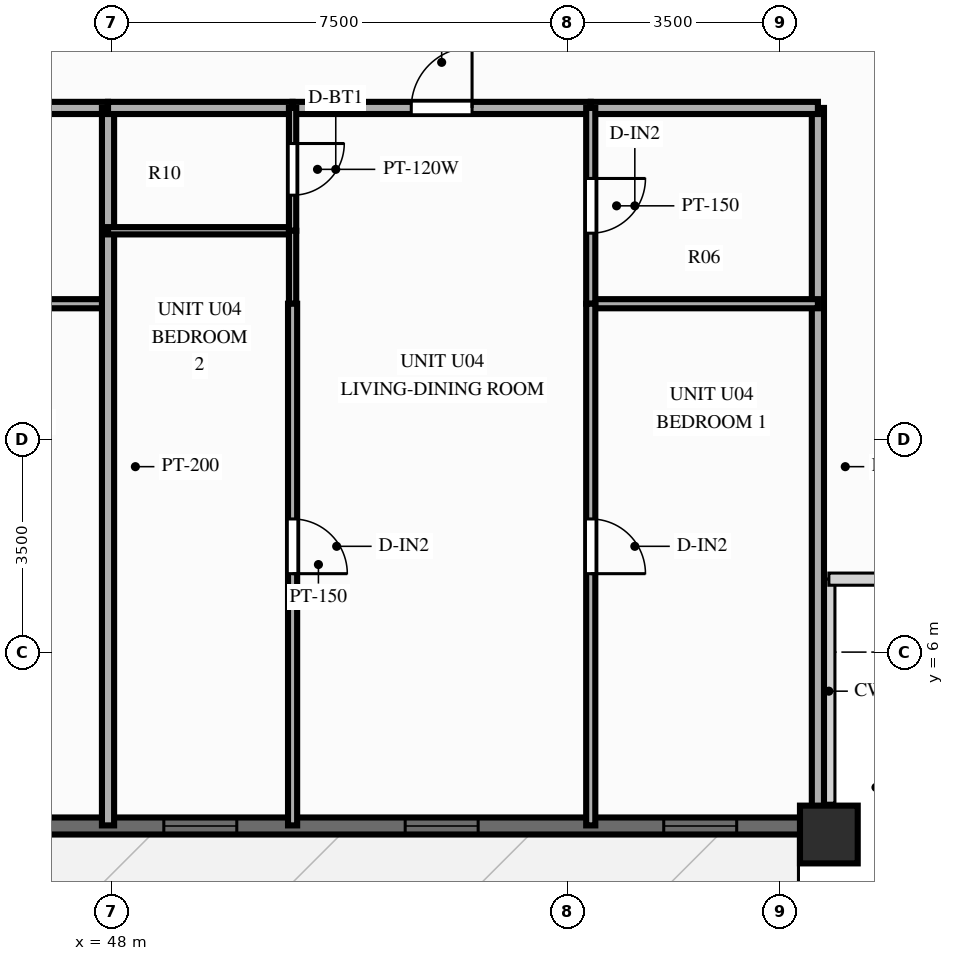
"""IFC4 building model, lengths in metres.
Left out: names, types, materials, properties, quantities, classifications, styles, units other than length and angle.
Written with IfcOpenShell. Run it as: python <this file> out.ifc"""

import sys

from ifc_helpers import new_model, si_unit, direction, frame, frame_2d, origin, origin_2d, place, context, subcontext, project, spatial, rectangle, extrude, source, transform, mapped, element, fill, save


model = new_model("IFC4")
c1 = context("Model", 3, precision=1e-05, world=origin(), true_north=direction((0.0, 1.0)))
c2 = subcontext(c1, "Body", "Model", "MODEL_VIEW")
j1 = project(units=[si_unit("LENGTHUNIT", "METRE"), si_unit("PLANEANGLEUNIT", "RADIAN")], contexts=[c1])
p1 = place(None, origin())
s1 = spatial("IfcSite", under=j1, at=p1, CompositionType="ELEMENT")
p2 = place(p1, origin())
s2 = spatial("IfcBuilding", under=s1, at=p2, CompositionType="ELEMENT")
p3 = place(p2, frame((0.0, 0.0, 89.85)))
s3 = spatial("IfcBuildingStorey", under=s2, at=p3, CompositionType="ELEMENT", Elevation=89.85)
m1 = source(origin(), c2, "Body", "SweptSolid", [
    extrude(rectangle(XDim=0.95, YDim=0.95, at=origin_2d()), origin(), (0.0, 0.0, 1.0), 3.0),
])
p4 = place(p3, frame((59.8, 3.0, 0.0), z_axis=(0.0, 0.0, 1.0), x_axis=(1.0, 0.0, 0.0)))
e1 = element("IfcColumn", 1, at=p4, inside=s3, PredefinedType="COLUMN", context=c2, shape_type="MappedRepresentation", body=[
    mapped(m1, transform((0.0, 0.0, 0.0), scale=1.0)),
])
p5 = place(p3, frame((16.2, 3.14, 0.0), z_axis=(0.0, 0.0, 1.0), x_axis=(1.0, 0.0, 0.0)))
e2 = element("IfcWall", 2, at=p5, inside=s3, PredefinedType="SOLIDWALL", context=c2, shape_type="SweptSolid", body=[
    extrude(rectangle(XDim=43.6, YDim=0.28, at=frame_2d((21.8, 0.0))), origin(), (0.0, 0.0, 1.0), 2.28),
])
p6 = place(p5, frame((1.022, 0.0, 0.25)))
e3 = element("IfcOpeningElement", 3, at=p6, cuts=e2, PredefinedType="OPENING", context=c2, shape_type="SweptSolid", body=[
    extrude(rectangle(XDim=1.2, YDim=1.5, at=frame_2d((0.6, 0.75))), frame((0.0, 0.152, 0.0), z_axis=(0.0, -1.0, 0.0), x_axis=(1.0, 0.0, 0.0)), (0.0, 0.0, 1.0), 0.304),
])
p7 = place(p5, frame((4.038, 0.0, 0.25)))
e4 = element("IfcOpeningElement", 4, at=p7, cuts=e2, PredefinedType="OPENING", context=c2, shape_type="SweptSolid", body=[
    extrude(rectangle(XDim=1.2, YDim=1.5, at=frame_2d((0.6, 0.75))), frame((0.0, 0.152, 0.0), z_axis=(0.0, -1.0, 0.0), x_axis=(1.0, 0.0, 0.0)), (0.0, 0.0, 1.0), 0.304),
])
p8 = place(p5, frame((7.635, 0.0, 0.25)))
e5 = element("IfcOpeningElement", 5, at=p8, cuts=e2, PredefinedType="OPENING", context=c2, shape_type="SweptSolid", body=[
    extrude(rectangle(XDim=1.2, YDim=1.5, at=frame_2d((0.6, 0.75))), frame((0.0, 0.152, 0.0), z_axis=(0.0, -1.0, 0.0), x_axis=(1.0, 0.0, 0.0)), (0.0, 0.0, 1.0), 0.304),
])
p9 = place(p5, frame((10.9, 0.0, 0.25)))
e6 = element("IfcOpeningElement", 6, at=p9, cuts=e2, PredefinedType="OPENING", context=c2, shape_type="SweptSolid", body=[
    extrude(rectangle(XDim=1.2, YDim=1.5, at=frame_2d((0.6, 0.75))), frame((0.0, 0.152, 0.0), z_axis=(0.0, -1.0, 0.0), x_axis=(1.0, 0.0, 0.0)), (0.0, 0.0, 1.0), 0.304),
])
p10 = place(p5, frame((13.33, 0.0, 0.25)))
e7 = element("IfcOpeningElement", 7, at=p10, cuts=e2, PredefinedType="OPENING", context=c2, shape_type="SweptSolid", body=[
    extrude(rectangle(XDim=1.2, YDim=1.5, at=frame_2d((0.6, 0.75))), frame((0.0, 0.152, 0.0), z_axis=(0.0, -1.0, 0.0), x_axis=(1.0, 0.0, 0.0)), (0.0, 0.0, 1.0), 0.304),
])
p11 = place(p5, frame((17.581, 0.0, 0.25)))
e8 = element("IfcOpeningElement", 8, at=p11, cuts=e2, PredefinedType="OPENING", context=c2, shape_type="SweptSolid", body=[
    extrude(rectangle(XDim=1.2, YDim=1.5, at=frame_2d((0.6, 0.75))), frame((0.0, 0.152, 0.0), z_axis=(0.0, -1.0, 0.0), x_axis=(1.0, 0.0, 0.0)), (0.0, 0.0, 1.0), 0.304),
])
p12 = place(p5, frame((20.988, 0.0, 0.25)))
e9 = element("IfcOpeningElement", 9, at=p12, cuts=e2, PredefinedType="OPENING", context=c2, shape_type="SweptSolid", body=[
    extrude(rectangle(XDim=1.2, YDim=1.5, at=frame_2d((0.6, 0.75))), frame((0.0, 0.152, 0.0), z_axis=(0.0, -1.0, 0.0), x_axis=(1.0, 0.0, 0.0)), (0.0, 0.0, 1.0), 0.304),
])
p13 = place(p5, frame((26.095, 0.0, 0.0), z_axis=(0.0, 0.0, 1.0), x_axis=(-1.0, 0.0, 0.0)))
e10 = element("IfcOpeningElement", 10, at=p13, cuts=e2, PredefinedType="OPENING", context=c2, shape_type="SweptSolid", body=[
    extrude(rectangle(XDim=1.1, YDim=2.15, at=frame_2d((0.55, 1.075))), frame((0.0, 0.152, 0.0), z_axis=(0.0, -1.0, 0.0), x_axis=(1.0, 0.0, 0.0)), (0.0, 0.0, 1.0), 0.304),
])
p14 = place(p5, frame((29.58, 0.0, 0.25)))
e11 = element("IfcOpeningElement", 11, at=p14, cuts=e2, PredefinedType="OPENING", context=c2, shape_type="SweptSolid", body=[
    extrude(rectangle(XDim=1.2, YDim=1.5, at=frame_2d((0.6, 0.75))), frame((0.0, 0.152, 0.0), z_axis=(0.0, -1.0, 0.0), x_axis=(1.0, 0.0, 0.0)), (0.0, 0.0, 1.0), 0.304),
])
p15 = place(p5, frame((32.663, 0.0, 0.25)))
e12 = element("IfcOpeningElement", 12, at=p15, cuts=e2, PredefinedType="OPENING", context=c2, shape_type="SweptSolid", body=[
    extrude(rectangle(XDim=1.2, YDim=1.5, at=frame_2d((0.6, 0.75))), frame((0.0, 0.152, 0.0), z_axis=(0.0, -1.0, 0.0), x_axis=(1.0, 0.0, 0.0)), (0.0, 0.0, 1.0), 0.304),
])
p16 = place(p5, frame((36.632, 0.0, 0.25)))
e13 = element("IfcOpeningElement", 13, at=p16, cuts=e2, PredefinedType="OPENING", context=c2, shape_type="SweptSolid", body=[
    extrude(rectangle(XDim=1.2, YDim=1.5, at=frame_2d((0.6, 0.75))), frame((0.0, 0.152, 0.0), z_axis=(0.0, -1.0, 0.0), x_axis=(1.0, 0.0, 0.0)), (0.0, 0.0, 1.0), 0.304),
])
p17 = place(p5, frame((40.885, 0.0, 0.25)))
e14 = element("IfcOpeningElement", 14, at=p17, cuts=e2, PredefinedType="OPENING", context=c2, shape_type="SweptSolid", body=[
    extrude(rectangle(XDim=1.2, YDim=1.5, at=frame_2d((0.6, 0.75))), frame((0.0, 0.152, 0.0), z_axis=(0.0, -1.0, 0.0), x_axis=(1.0, 0.0, 0.0)), (0.0, 0.0, 1.0), 0.304),
])
p18 = place(p3, frame((59.62, 14.95, 0.0), z_axis=(0.0, 0.0, 1.0), x_axis=(0.0, -1.0, 0.0)))
e15 = element("IfcWall", 15, at=p18, inside=s3, PredefinedType="PARTITIONING", context=c2, shape_type="SweptSolid", body=[
    extrude(rectangle(XDim=11.8, YDim=0.2, at=frame_2d((5.9, 0.0))), origin(), (0.0, 0.0, 1.0), 2.79),
])
p19 = place(p3, frame((44.22, 14.95, 0.0), z_axis=(0.0, 0.0, 1.0), x_axis=(1.0, 0.0, 0.0)))
e16 = element("IfcWall", 16, at=p19, inside=s3, PredefinedType="PARTITIONING", context=c2, shape_type="SweptSolid", body=[
    extrude(rectangle(XDim=3.725, YDim=0.2, at=frame_2d((1.863, 0.0))), origin(), (0.0, 0.0, 1.0), 2.79),
])
p20 = place(p3, frame((44.22, 11.73, 0.0), z_axis=(0.0, 0.0, 1.0), x_axis=(1.0, 0.0, 0.0)))
e17 = element("IfcWall", 17, at=p20, inside=s3, PredefinedType="PARTITIONING", context=c2, shape_type="SweptSolid", body=[
    extrude(rectangle(XDim=3.725, YDim=0.15, at=frame_2d((1.863, 0.0))), origin(), (0.0, 0.0, 1.0), 2.79),
])
p21 = place(p3, frame((47.945, 14.95, 0.0), z_axis=(0.0, 0.0, 1.0), x_axis=(0.0, -1.0, 0.0)))
e18 = element("IfcWall", 18, at=p21, inside=s3, PredefinedType="PARTITIONING", context=c2, shape_type="SweptSolid", body=[
    extrude(rectangle(XDim=11.8, YDim=0.2, at=frame_2d((5.9, 0.0))), origin(), (0.0, 0.0, 1.0), 2.79),
])
p22 = place(p3, frame((47.945, 14.95, 0.0), z_axis=(0.0, 0.0, 1.0), x_axis=(1.0, 0.0, 0.0)))
e19 = element("IfcWall", 19, at=p22, inside=s3, PredefinedType="PARTITIONING", context=c2, shape_type="SweptSolid", body=[
    extrude(rectangle(XDim=3.035, YDim=0.2, at=frame_2d((1.518, 0.0))), origin(), (0.0, 0.0, 1.0), 2.79),
])
p23 = place(p3, frame((50.981, 14.95, 0.0), z_axis=(0.0, 0.0, 1.0), x_axis=(1.0, 0.0, 0.0)))
e20 = element("IfcWall", 20, at=p23, inside=s3, PredefinedType="PARTITIONING", context=c2, shape_type="SweptSolid", body=[
    extrude(rectangle(XDim=4.903, YDim=0.2, at=frame_2d((2.452, 0.0))), origin(), (0.0, 0.0, 1.0), 2.79),
])
p24 = place(p23, frame((1.952, 0.0, 0.0)))
e21 = element("IfcOpeningElement", 21, at=p24, cuts=e20, PredefinedType="OPENING", context=c2, shape_type="SweptSolid", body=[
    extrude(rectangle(XDim=1.0, YDim=2.15, at=frame_2d((0.5, 1.075))), frame((0.0, 0.112, 0.0), z_axis=(0.0, -1.0, 0.0), x_axis=(1.0, 0.0, 0.0)), (0.0, 0.0, 1.0), 0.224),
])
p25 = place(p3, frame((55.884, 14.95, 0.0), z_axis=(0.0, 0.0, 1.0), x_axis=(1.0, 0.0, 0.0)))
e22 = element("IfcWall", 22, at=p25, inside=s3, PredefinedType="PARTITIONING", context=c2, shape_type="SweptSolid", body=[
    extrude(rectangle(XDim=3.736, YDim=0.2, at=frame_2d((1.868, 0.0))), origin(), (0.0, 0.0, 1.0), 2.79),
])
p26 = place(p3, frame((47.945, 12.93, 0.0), z_axis=(0.0, 0.0, 1.0), x_axis=(1.0, 0.0, 0.0)))
e23 = element("IfcWall", 23, at=p26, inside=s3, PredefinedType="PARTITIONING", context=c2, shape_type="SweptSolid", body=[
    extrude(rectangle(XDim=3.035, YDim=0.12, at=frame_2d((1.518, 0.0))), origin(), (0.0, 0.0, 1.0), 2.79),
])
p27 = place(p3, frame((55.884, 11.73, 0.0), z_axis=(0.0, 0.0, 1.0), x_axis=(1.0, 0.0, 0.0)))
e24 = element("IfcWall", 24, at=p27, inside=s3, PredefinedType="PARTITIONING", context=c2, shape_type="SweptSolid", body=[
    extrude(rectangle(XDim=3.736, YDim=0.15, at=frame_2d((1.868, 0.0))), origin(), (0.0, 0.0, 1.0), 2.79),
])
p28 = place(p3, frame((50.981, 14.95, 0.0), z_axis=(0.0, 0.0, 1.0), x_axis=(0.0, -1.0, 0.0)))
e25 = element("IfcWall", 25, at=p28, inside=s3, PredefinedType="PARTITIONING", context=c2, shape_type="SweptSolid", body=[
    extrude(rectangle(XDim=2.02, YDim=0.12, at=frame_2d((1.01, 0.0))), origin(), (0.0, 0.0, 1.0), 2.79),
])
p29 = place(p28, frame((0.585, 0.0, 0.0)))
e26 = element("IfcOpeningElement", 26, at=p29, cuts=e25, PredefinedType="OPENING", context=c2, shape_type="SweptSolid", body=[
    extrude(rectangle(XDim=0.85, YDim=2.05, at=frame_2d((0.425, 1.025))), frame((0.0, 0.072, 0.0), z_axis=(0.0, -1.0, 0.0), x_axis=(1.0, 0.0, 0.0)), (0.0, 0.0, 1.0), 0.144),
])
p30 = place(p3, frame((50.981, 12.93, 0.0), z_axis=(0.0, 0.0, 1.0), x_axis=(0.0, -1.0, 0.0)))
e27 = element("IfcWall", 27, at=p30, inside=s3, PredefinedType="PARTITIONING", context=c2, shape_type="SweptSolid", body=[
    extrude(rectangle(XDim=1.2, YDim=0.12, at=frame_2d((0.6, 0.0))), origin(), (0.0, 0.0, 1.0), 2.79),
])
p31 = place(p3, frame((50.981, 11.73, 0.0), z_axis=(0.0, 0.0, 1.0), x_axis=(0.0, -1.0, 0.0)))
e28 = element("IfcWall", 28, at=p31, inside=s3, PredefinedType="PARTITIONING", context=c2, shape_type="SweptSolid", body=[
    extrude(rectangle(XDim=8.58, YDim=0.15, at=frame_2d((4.29, 0.0))), origin(), (0.0, 0.0, 1.0), 2.79),
])
p32 = place(p31, frame((3.54, 0.0, 0.0)))
e29 = element("IfcOpeningElement", 29, at=p32, cuts=e28, PredefinedType="OPENING", context=c2, shape_type="SweptSolid", body=[
    extrude(rectangle(XDim=0.9, YDim=2.1, at=frame_2d((0.45, 1.05))), frame((0.0, 0.087, 0.0), z_axis=(0.0, -1.0, 0.0), x_axis=(1.0, 0.0, 0.0)), (0.0, 0.0, 1.0), 0.174),
])
p33 = place(p3, frame((55.884, 14.95, 0.0), z_axis=(0.0, 0.0, 1.0), x_axis=(0.0, -1.0, 0.0)))
e30 = element("IfcWall", 30, at=p33, inside=s3, PredefinedType="PARTITIONING", context=c2, shape_type="SweptSolid", body=[
    extrude(rectangle(XDim=3.22, YDim=0.15, at=frame_2d((1.61, 0.0))), origin(), (0.0, 0.0, 1.0), 2.79),
])
p34 = place(p33, frame((1.16, 0.0, 0.0)))
e31 = element("IfcOpeningElement", 31, at=p34, cuts=e30, PredefinedType="OPENING", context=c2, shape_type="SweptSolid", body=[
    extrude(rectangle(XDim=0.9, YDim=2.1, at=frame_2d((0.45, 1.05))), frame((0.0, 0.087, 0.0), z_axis=(0.0, -1.0, 0.0), x_axis=(1.0, 0.0, 0.0)), (0.0, 0.0, 1.0), 0.174),
])
p35 = place(p3, frame((55.884, 11.73, 0.0), z_axis=(0.0, 0.0, 1.0), x_axis=(0.0, -1.0, 0.0)))
e32 = element("IfcWall", 32, at=p35, inside=s3, PredefinedType="PARTITIONING", context=c2, shape_type="SweptSolid", body=[
    extrude(rectangle(XDim=8.58, YDim=0.15, at=frame_2d((4.29, 0.0))), origin(), (0.0, 0.0, 1.0), 2.79),
])
p36 = place(p35, frame((3.54, 0.0, 0.0)))
e33 = element("IfcOpeningElement", 33, at=p36, cuts=e32, PredefinedType="OPENING", context=c2, shape_type="SweptSolid", body=[
    extrude(rectangle(XDim=0.9, YDim=2.1, at=frame_2d((0.45, 1.05))), frame((0.0, 0.087, 0.0), z_axis=(0.0, -1.0, 0.0), x_axis=(1.0, 0.0, 0.0)), (0.0, 0.0, 1.0), 0.174),
])
m2 = source(origin(), c2, "Body", "SweptSolid", [
    extrude(rectangle(XDim=1.2, YDim=1.5, at=frame_2d((0.6, 0.75))), frame((0.0, 0.03, 0.0), z_axis=(0.0, -1.0, 0.0), x_axis=(1.0, 0.0, 0.0)), (0.0, 0.0, 1.0), 0.06),
])
p37 = place(p15, origin())
e34 = element("IfcWindow", 34, at=p37, inside=s3, PartitioningType="SINGLE_PANEL", PredefinedType="WINDOW", context=c2, shape_type="MappedRepresentation", body=[
    mapped(m2, transform((0.0, 0.0, 0.0), scale=1.0)),
])
fill(e12, e34)
p38 = place(p16, origin())
e35 = element("IfcWindow", 35, at=p38, inside=s3, PartitioningType="SINGLE_PANEL", PredefinedType="WINDOW", context=c2, shape_type="MappedRepresentation", body=[
    mapped(m2, transform((0.0, 0.0, 0.0), scale=1.0)),
])
fill(e13, e35)
p39 = place(p17, origin())
e36 = element("IfcWindow", 36, at=p39, inside=s3, PartitioningType="SINGLE_PANEL", PredefinedType="WINDOW", context=c2, shape_type="MappedRepresentation", body=[
    mapped(m2, transform((0.0, 0.0, 0.0), scale=1.0)),
])
fill(e14, e36)
m3 = source(origin(), c2, "Body", "SweptSolid", [
    extrude(rectangle(XDim=1.0, YDim=2.15, at=frame_2d((0.5, 1.075))), frame((0.0, 0.025, 0.0), z_axis=(0.0, -1.0, 0.0), x_axis=(1.0, 0.0, 0.0)), (0.0, 0.0, 1.0), 0.05),
])
p40 = place(p24, origin())
e37 = element("IfcDoor", 37, at=p40, inside=s3, OperationType="SINGLE_SWING_RIGHT", PredefinedType="DOOR", context=c2, shape_type="MappedRepresentation", body=[
    mapped(m3, transform((0.0, 0.0, 0.0), scale=1.0)),
])
fill(e21, e37)
m4 = source(origin(), c2, "Body", "SweptSolid", [
    extrude(rectangle(XDim=0.85, YDim=2.05, at=frame_2d((0.425, 1.025))), frame((0.0, 0.025, 0.0), z_axis=(0.0, -1.0, 0.0), x_axis=(1.0, 0.0, 0.0)), (0.0, 0.0, 1.0), 0.05),
])
p41 = place(p29, origin())
e38 = element("IfcDoor", 38, at=p41, inside=s3, OperationType="SINGLE_SWING_LEFT", PredefinedType="DOOR", context=c2, shape_type="MappedRepresentation", body=[
    mapped(m4, transform((0.0, 0.0, 0.0), scale=1.0)),
])
fill(e26, e38)
m5 = source(origin(), c2, "Body", "SweptSolid", [
    extrude(rectangle(XDim=0.9, YDim=2.1, at=frame_2d((0.45, 1.05))), frame((0.0, 0.025, 0.0), z_axis=(0.0, -1.0, 0.0), x_axis=(1.0, 0.0, 0.0)), (0.0, 0.0, 1.0), 0.05),
])
p42 = place(p32, origin())
e39 = element("IfcDoor", 39, at=p42, inside=s3, OperationType="SINGLE_SWING_RIGHT", PredefinedType="DOOR", context=c2, shape_type="MappedRepresentation", body=[
    mapped(m5, transform((0.0, 0.0, 0.0), scale=1.0)),
])
fill(e29, e39)
p43 = place(p34, origin())
e40 = element("IfcDoor", 40, at=p43, inside=s3, OperationType="SINGLE_SWING_LEFT", PredefinedType="DOOR", context=c2, shape_type="MappedRepresentation", body=[
    mapped(m5, transform((0.0, 0.0, 0.0), scale=1.0)),
])
fill(e31, e40)
p44 = place(p36, origin())
e41 = element("IfcDoor", 41, at=p44, inside=s3, OperationType="SINGLE_SWING_RIGHT", PredefinedType="DOOR", context=c2, shape_type="MappedRepresentation", body=[
    mapped(m5, transform((0.0, 0.0, 0.0), scale=1.0)),
])
fill(e33, e41)
save(model, sys.argv[1])
